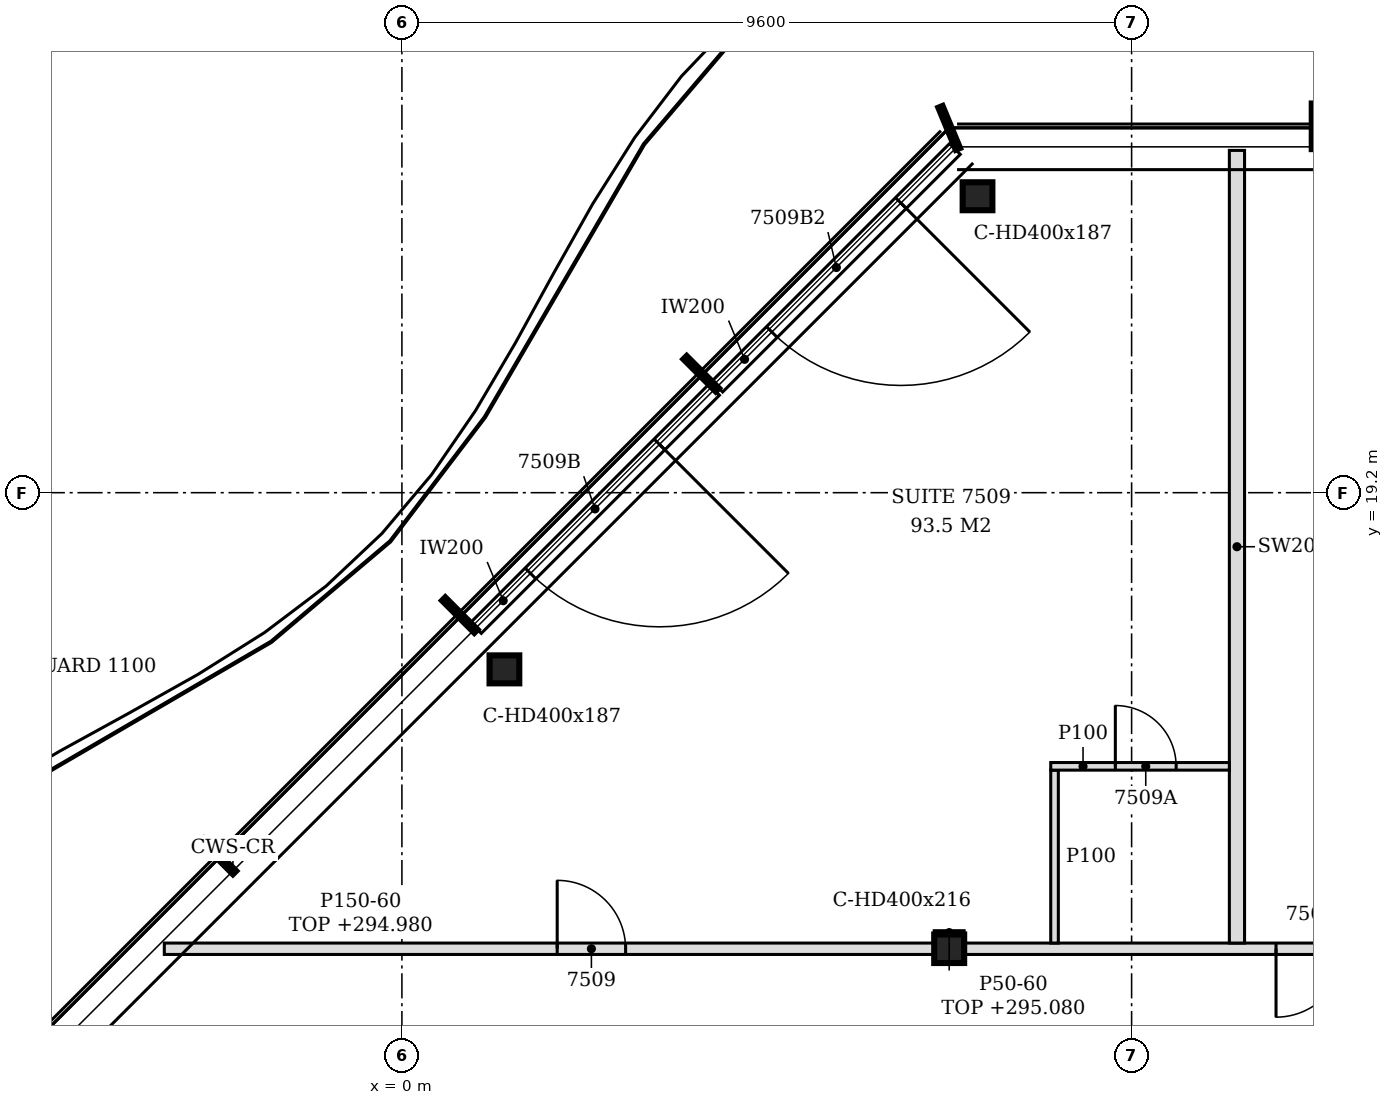
"""IFC4 building model, lengths in metres.
Left out: names, types, materials, properties, quantities, classifications, styles, units other than length and angle.
Written with IfcOpenShell. Run it as: python <this file> out.ifc"""

import sys

from ifc_helpers import new_model, si_unit, direction, frame, frame_2d, origin, origin_2d, place, context, subcontext, project, spatial, polyline, rectangle, i_section, outline, extrude, element, fill, save


model = new_model("IFC4")
c1 = context("Model", 3, precision=1e-05, world=origin(), true_north=direction((0.0, 1.0)))
c2 = subcontext(c1, "Body", "Model", "MODEL_VIEW")
j1 = project(units=[si_unit("LENGTHUNIT", "METRE"), si_unit("PLANEANGLEUNIT", "RADIAN")], contexts=[c1])
p1 = place(None, origin())
s1 = spatial("IfcSite", under=j1, at=p1, CompositionType="ELEMENT")
p2 = place(p1, origin())
s2 = spatial("IfcBuilding", under=s1, at=p2, CompositionType="ELEMENT")
p3 = place(p2, frame((0.0, 0.0, 292.2)))
s3 = spatial("IfcBuildingStorey", under=s2, at=p3, CompositionType="ELEMENT", Elevation=292.2)
for number, where, z_axis, x_axis in (
    (1, (7.573, 23.1, -0.15), (0.0, 0.0, 1.0), (1.0, 0.0, 0.0)),
    (2, (1.348, 16.876, -0.15), (0.0, 0.0, 1.0), (1.0, 0.0, 0.0)),
):
    element("IfcColumn", number, at=place(p3, frame(where, z_axis=z_axis, x_axis=x_axis)), inside=s3, PredefinedType="COLUMN", context=c2, shape_type="SweptSolid", body=[
        extrude(i_section(OverallWidth=0.391, OverallDepth=0.368, WebThickness=0.015, FlangeThickness=0.024, FilletRadius=0.015, at=origin_2d()), origin(), (0.0, 0.0, 1.0), 3.55),
    ])
p4 = place(p3, frame((7.2, 13.2, -0.15), z_axis=(0.0, 0.0, 1.0), x_axis=(1.0, 0.0, 0.0)))
e3 = element("IfcColumn", 3, at=p4, inside=s3, PredefinedType="COLUMN", context=c2, shape_type="SweptSolid", body=[
    extrude(i_section(OverallWidth=0.394, OverallDepth=0.375, WebThickness=0.017, FlangeThickness=0.028, FilletRadius=0.015, at=origin_2d()), origin(), (0.0, 0.0, 1.0), 3.55),
])
p5 = place(p3, frame((7.275, 23.722, 0.0), z_axis=(0.0, 0.0, 1.0), x_axis=(-0.707134392299, -0.707079168996, 0.0)))
e4 = element("IfcWall", 4, at=p5, inside=s3, PredefinedType="NOTDEFINED", context=c2, shape_type="SweptSolid", body=[
    extrude(rectangle(XDim=4.421, YDim=0.2, at=frame_2d((2.21, 0.0))), origin(), (0.0, 0.0, 1.0), 3.4),
])
p6 = place(p5, frame((1.005, 0.0, 0.0)))
e5 = element("IfcOpeningElement", 5, at=p6, cuts=e4, PredefinedType="OPENING", context=c2, shape_type="SweptSolid", body=[
    extrude(rectangle(XDim=2.4, YDim=2.4, at=frame_2d((1.2, 1.2))), frame((0.0, 0.11, 0.0), z_axis=(0.0, -1.0, 0.0), x_axis=(1.0, 0.0, 0.0)), (0.0, 0.0, 1.0), 0.22),
])
p7 = place(p3, frame((4.107, 20.553, 0.0), z_axis=(0.0, 0.0, 1.0), x_axis=(-0.707079231393, -0.707134329907, 0.0)))
e6 = element("IfcWall", 6, at=p7, inside=s3, PredefinedType="NOTDEFINED", context=c2, shape_type="SweptSolid", body=[
    extrude(rectangle(XDim=4.431, YDim=0.2, at=frame_2d((2.215, 0.0))), origin(), (0.0, 0.0, 1.0), 3.4),
])
p8 = place(p7, frame((1.015, 0.0, 0.0)))
e7 = element("IfcOpeningElement", 7, at=p8, cuts=e6, PredefinedType="OPENING", context=c2, shape_type="SweptSolid", body=[
    extrude(rectangle(XDim=2.4, YDim=2.4, at=frame_2d((1.2, 1.2))), frame((0.0, 0.11, 0.0), z_axis=(0.0, -1.0, 0.0), x_axis=(1.0, 0.0, 0.0)), (0.0, 0.0, 1.0), 0.22),
])
p9 = place(p3, frame((-3.126, 13.2, 0.0), z_axis=(0.0, 0.0, 1.0), x_axis=(1.0, 0.0, 0.0)))
e8 = element("IfcWall", 8, at=p9, inside=s3, PredefinedType="PARTITIONING", context=c2, shape_type="SweptSolid", body=[
    extrude(outline(polyline([(0.0, 0.0), (10.129, 0.0), (10.129, 2.78), (1.369, 2.78), (1.367, 2.58), (0.229, 2.58), (0.227, 2.78), (0.0, 2.78), (0.0, 0.0)])), frame((0.0, 0.075, 0.0), z_axis=(0.0, -1.0, 0.0), x_axis=(1.0, 0.0, 0.0)), (0.0, 0.0, 1.0), 0.15),
])
p10 = place(p9, frame((5.169, 0.0, 0.0)))
e9 = element("IfcOpeningElement", 9, at=p10, cuts=e8, PredefinedType="OPENING", context=c2, shape_type="SweptSolid", body=[
    extrude(rectangle(XDim=0.9, YDim=2.1, at=frame_2d((0.45, 1.05))), frame((0.0, 0.085, 0.0), z_axis=(0.0, -1.0, 0.0), x_axis=(1.0, 0.0, 0.0)), (0.0, 0.0, 1.0), 0.17),
])
p11 = place(p3, frame((7.397, 13.2, 0.0), z_axis=(0.0, 0.0, 1.0), x_axis=(1.0, 0.0, 0.0)))
e10 = element("IfcWall", 10, at=p11, inside=s3, PredefinedType="PARTITIONING", context=c2, shape_type="SweptSolid", body=[
    extrude(rectangle(XDim=11.606, YDim=0.15, at=frame_2d((5.803, 0.0))), origin(), (0.0, 0.0, 1.0), 2.78),
])
p12 = place(p11, frame((4.103, 0.0, 0.0)))
e11 = element("IfcOpeningElement", 11, at=p12, cuts=e10, PredefinedType="OPENING", context=c2, shape_type="SweptSolid", body=[
    extrude(rectangle(XDim=1.8, YDim=2.1, at=frame_2d((0.9, 1.05))), frame((0.0, 0.085, 0.0), z_axis=(0.0, -1.0, 0.0), x_axis=(1.0, 0.0, 0.0)), (0.0, 0.0, 1.0), 0.17),
])
p13 = place(p11, frame((6.053, 0.0, 0.0)))
e12 = element("IfcOpeningElement", 12, at=p13, cuts=e10, PredefinedType="OPENING", context=c2, shape_type="SweptSolid", body=[
    extrude(rectangle(XDim=1.0, YDim=2.1, at=frame_2d((0.5, 1.05))), frame((0.0, 0.085, 0.0), z_axis=(0.0, -1.0, 0.0), x_axis=(1.0, 0.0, 0.0)), (0.0, 0.0, 1.0), 0.17),
])
p14 = place(p3, frame((8.586, 13.275, 0.0), z_axis=(0.0, 0.0, 1.0), x_axis=(0.0, 1.0, 0.0)))
e13 = element("IfcWall", 13, at=p14, inside=s3, PredefinedType="PARTITIONING", context=c2, shape_type="SweptSolid", body=[
    extrude(outline(polyline([(0.0, 0.0), (2.275, 0.0), (2.275, 3.4), (0.075, 3.4), (0.073, 2.78), (0.0, 2.78), (0.0, 0.0)])), frame((0.0, 0.05, 0.0), z_axis=(0.0, -1.0, 0.0), x_axis=(1.0, 0.0, 0.0)), (0.0, 0.0, 1.0), 0.1),
])
p15 = place(p3, frame((10.986, 13.275, 0.0), z_axis=(0.0, 0.0, 1.0), x_axis=(0.0, 1.0, 0.0)))
e14 = element("IfcWall", 14, at=p15, inside=s3, PredefinedType="PARTITIONING", context=c2, shape_type="SweptSolid", body=[
    extrude(outline(polyline([(0.0, 0.0), (10.428, 0.0), (10.428, 3.4), (9.975, 3.4), (9.973, 2.88), (9.675, 2.88), (9.673, 3.4), (6.03, 3.4), (6.028, 2.83), (5.82, 2.83), (5.818, 3.4), (0.075, 3.4), (0.073, 2.78), (0.0, 2.78), (0.0, 0.0)])), frame((0.0, 0.1, 0.0), z_axis=(0.0, -1.0, 0.0), x_axis=(1.0, 0.0, 0.0)), (0.0, 0.0, 1.0), 0.2),
])
p16 = place(p3, frame((8.536, 15.6, 0.0), z_axis=(0.0, 0.0, 1.0), x_axis=(1.0, 0.0, 0.0)))
e15 = element("IfcWall", 15, at=p16, inside=s3, PredefinedType="PARTITIONING", context=c2, shape_type="SweptSolid", body=[
    extrude(rectangle(XDim=2.35, YDim=0.1, at=frame_2d((1.175, 0.0))), origin(), (0.0, 0.0, 1.0), 3.4),
])
p17 = place(p16, frame((0.85, 0.0, 0.0)))
e16 = element("IfcOpeningElement", 16, at=p17, cuts=e15, PredefinedType="OPENING", context=c2, shape_type="SweptSolid", body=[
    extrude(rectangle(XDim=0.8, YDim=2.1, at=frame_2d((0.4, 1.05))), frame((0.0, 0.06, 0.0), z_axis=(0.0, -1.0, 0.0), x_axis=(1.0, 0.0, 0.0)), (0.0, 0.0, 1.0), 0.12),
])
p18 = place(p3, frame((7.003, 13.413, 0.0), z_axis=(0.0, 0.0, 1.0), x_axis=(1.0, 0.0, 0.0)))
e17 = element("IfcWall", 17, at=p18, inside=s3, PredefinedType="PARTITIONING", context=c2, shape_type="SweptSolid", body=[
    extrude(rectangle(XDim=0.394, YDim=0.05, at=frame_2d((0.197, 0.0))), origin(), (0.0, 0.0, 1.0), 2.88),
])
p19 = place(p6, origin())
e18 = element("IfcDoor", 18, at=p19, inside=s3, OperationType="SINGLE_SWING_LEFT", PredefinedType="DOOR", context=c2, shape_type="SweptSolid", body=[
    extrude(rectangle(XDim=2.4, YDim=2.4, at=frame_2d((1.2, 1.2))), frame((0.0, 0.025, 0.0), z_axis=(0.0, -1.0, 0.0), x_axis=(1.0, 0.0, 0.0)), (0.0, 0.0, 1.0), 0.05),
])
fill(e5, e18)
p20 = place(p8, origin())
e19 = element("IfcDoor", 19, at=p20, inside=s3, OperationType="SINGLE_SWING_LEFT", PredefinedType="DOOR", context=c2, shape_type="SweptSolid", body=[
    extrude(rectangle(XDim=2.4, YDim=2.4, at=frame_2d((1.2, 1.2))), frame((0.0, 0.025, 0.0), z_axis=(0.0, -1.0, 0.0), x_axis=(1.0, 0.0, 0.0)), (0.0, 0.0, 1.0), 0.05),
])
fill(e7, e19)
p21 = place(p12, origin())
e20 = element("IfcDoor", 20, at=p21, inside=s3, OperationType="DOUBLE_DOOR_SINGLE_SWING", PredefinedType="DOOR", context=c2, shape_type="SweptSolid", body=[
    extrude(rectangle(XDim=1.8, YDim=2.1, at=frame_2d((0.9, 1.05))), frame((0.0, 0.025, 0.0), z_axis=(0.0, -1.0, 0.0), x_axis=(1.0, 0.0, 0.0)), (0.0, 0.0, 1.0), 0.05),
])
fill(e11, e20)
p22 = place(p10, origin())
e21 = element("IfcDoor", 21, at=p22, inside=s3, OperationType="SINGLE_SWING_LEFT", PredefinedType="DOOR", context=c2, shape_type="SweptSolid", body=[
    extrude(rectangle(XDim=0.9, YDim=2.1, at=frame_2d((0.45, 1.05))), frame((0.0, 0.025, 0.0), z_axis=(0.0, -1.0, 0.0), x_axis=(1.0, 0.0, 0.0)), (0.0, 0.0, 1.0), 0.05),
])
fill(e9, e21)
p23 = place(p17, origin())
e22 = element("IfcDoor", 22, at=p23, inside=s3, OperationType="SINGLE_SWING_LEFT", PredefinedType="DOOR", context=c2, shape_type="SweptSolid", body=[
    extrude(rectangle(XDim=0.8, YDim=2.1, at=frame_2d((0.4, 1.05))), frame((0.0, 0.025, 0.0), z_axis=(0.0, -1.0, 0.0), x_axis=(1.0, 0.0, 0.0)), (0.0, 0.0, 1.0), 0.05),
])
fill(e16, e22)
save(model, sys.argv[1])
